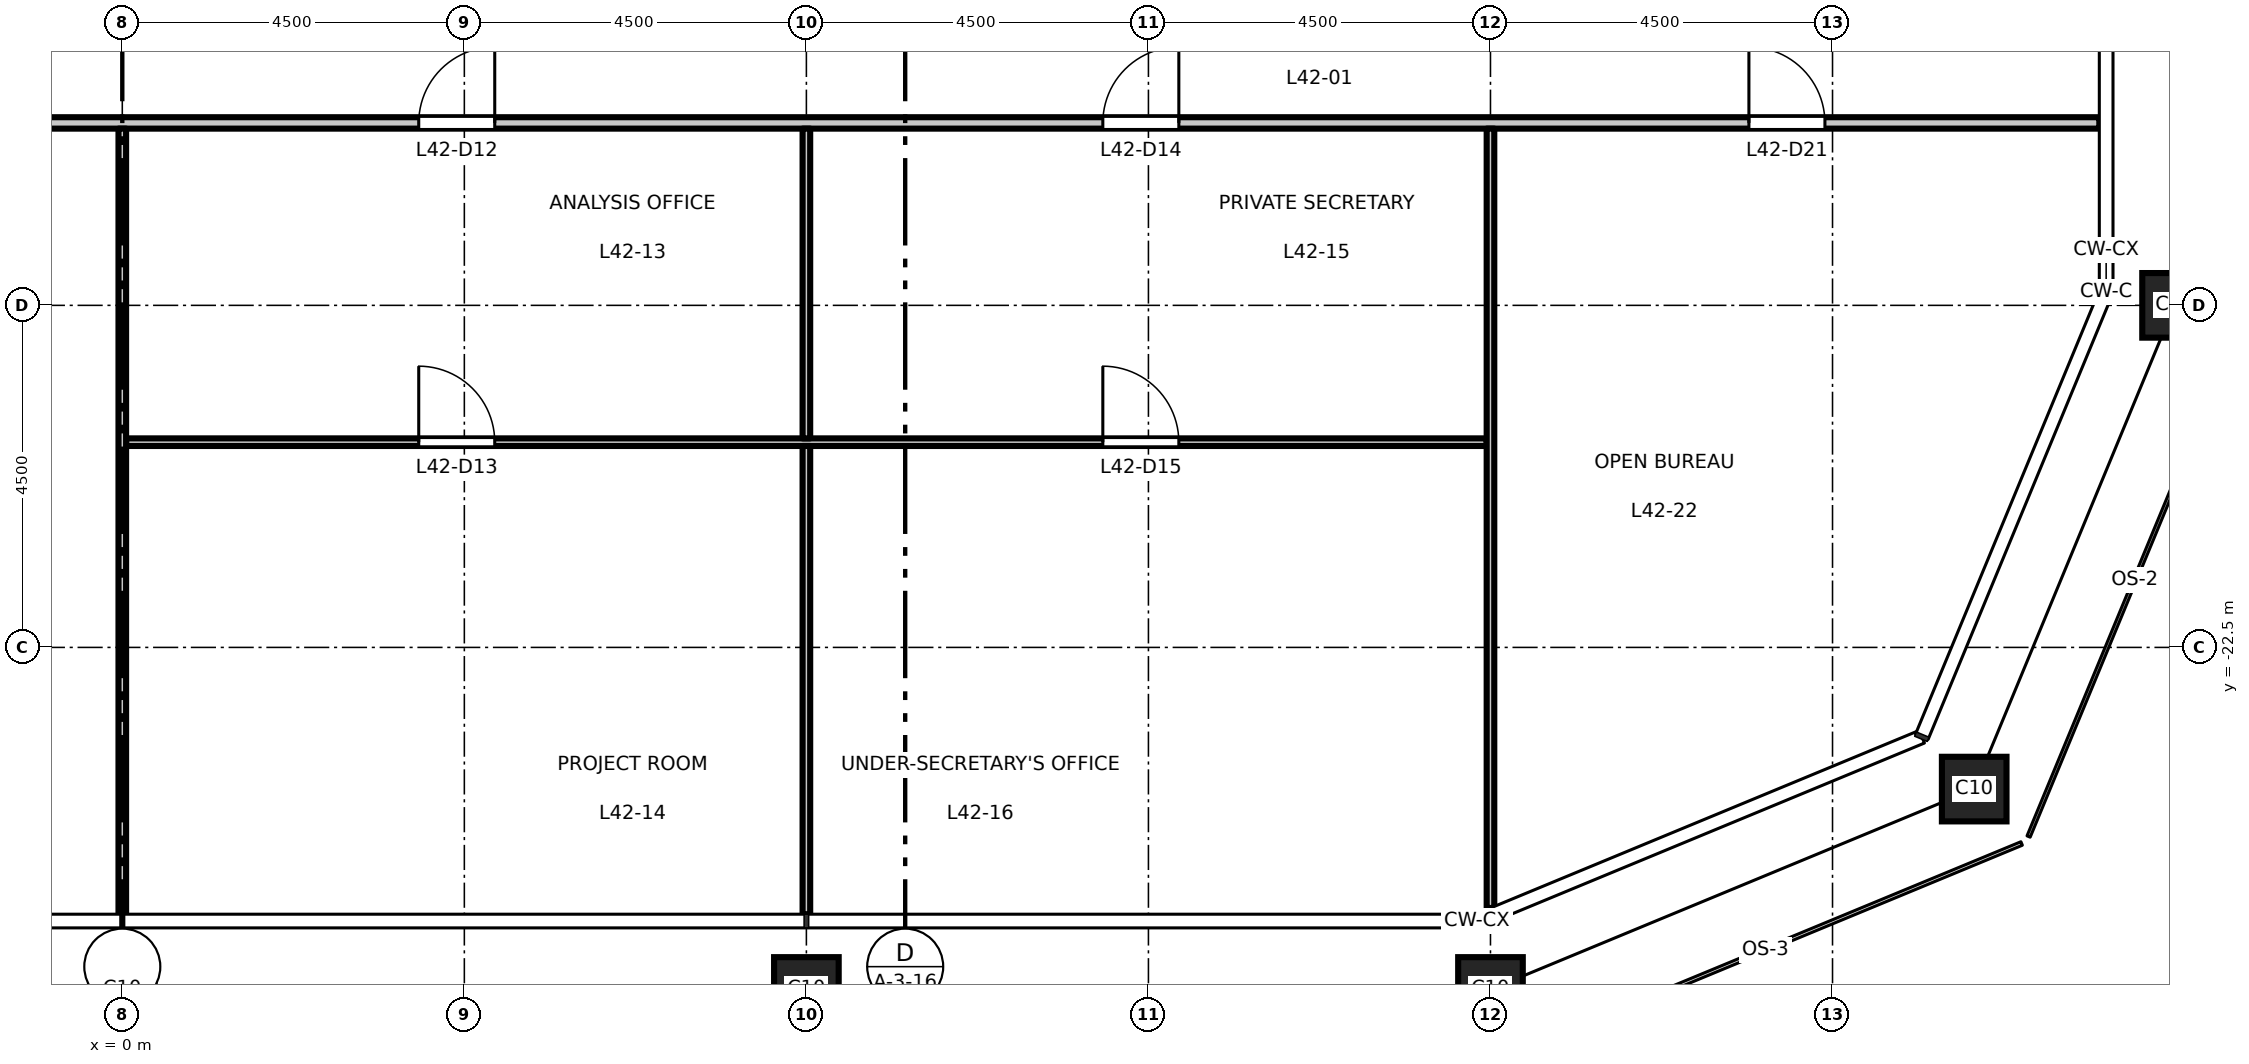
"""IFC4 building model, lengths in metres.
Left out: names, types, materials, properties, quantities, classifications, styles, units other than length and angle.
Written with IfcOpenShell. Run it as: python <this file> out.ifc"""

import sys

from ifc_helpers import new_model, si_unit, direction, frame, frame_2d, origin, origin_2d, place, context, subcontext, project, spatial, rectangle, hollow_rectangle, extrude, element, fill, save


model = new_model("IFC4")
c1 = context("Model", 3, precision=1e-05, world=origin(), true_north=direction((0.0, 1.0)))
c2 = subcontext(c1, "Body", "Model", "MODEL_VIEW")
j1 = project(units=[si_unit("LENGTHUNIT", "METRE"), si_unit("PLANEANGLEUNIT", "RADIAN")], contexts=[c1])
p1 = place(None, origin())
s1 = spatial("IfcSite", under=j1, at=p1, CompositionType="ELEMENT")
p2 = place(p1, origin())
s2 = spatial("IfcBuilding", under=s1, at=p2, CompositionType="ELEMENT")
p3 = place(p2, frame((0.0, 0.0, 197.2)))
s3 = spatial("IfcBuildingStorey", under=s2, at=p3, CompositionType="ELEMENT", Elevation=197.2)
for number, where, z_axis, x_axis in (
    (1, (0.0, -27.0, 0.0), (0.0, 0.0, 1.0), (1.0, 0.0, 0.0)),
    (2, (9.0, -27.0, 0.0), (0.0, 0.0, 1.0), (1.0, 0.0, 0.0)),
    (3, (18.0, -27.0, 0.0), (0.0, 0.0, 1.0), (1.0, 0.0, 0.0)),
    (4, (24.364, -24.364, 0.0), (0.0, 0.0, 1.0), (1.0, 0.0, 0.0)),
    (5, (27.0, -18.0, 0.0), (0.0, 0.0, 1.0), (1.0, 0.0, 0.0)),
):
    element("IfcColumn", number, at=place(p3, frame(where, z_axis=z_axis, x_axis=x_axis)), inside=s3, PredefinedType="COLUMN", context=c2, shape_type="SweptSolid", body=[
        extrude(hollow_rectangle(XDim=0.85, YDim=0.85, WallThickness=0.05, at=origin_2d()), origin(), (0.0, 0.0, 1.0), 4.5),
    ])
p4 = place(p3, frame((0.05, -19.8, 0.0), z_axis=(0.0, 0.0, 1.0), x_axis=(1.0, 0.0, 0.0)))
e6 = element("IfcWall", 6, at=p4, inside=s3, PredefinedType="PARTITIONING", context=c2, shape_type="SweptSolid", body=[
    extrude(rectangle(XDim=17.9, YDim=0.1, at=frame_2d((8.95, 0.0))), origin(), (0.0, 0.0, 1.0), 4.35),
])
p5 = place(p4, frame((3.85, 0.0, 0.0)))
e7 = element("IfcOpeningElement", 7, at=p5, cuts=e6, PredefinedType="OPENING", context=c2, shape_type="SweptSolid", body=[
    extrude(rectangle(XDim=1.0, YDim=2.1, at=frame_2d((0.5, 1.05))), frame((0.0, 0.06, 0.0), z_axis=(0.0, -1.0, 0.0), x_axis=(1.0, 0.0, 0.0)), (0.0, 0.0, 1.0), 0.12),
])
p6 = place(p4, frame((12.85, 0.0, 0.0)))
e8 = element("IfcOpeningElement", 8, at=p6, cuts=e6, PredefinedType="OPENING", context=c2, shape_type="SweptSolid", body=[
    extrude(rectangle(XDim=1.0, YDim=2.1, at=frame_2d((0.5, 1.05))), frame((0.0, 0.06, 0.0), z_axis=(0.0, -1.0, 0.0), x_axis=(1.0, 0.0, 0.0)), (0.0, 0.0, 1.0), 0.12),
])
p7 = place(p3, frame((-26.01, -15.6, 0.0), z_axis=(0.0, 0.0, 1.0), x_axis=(1.0, 0.0, 0.0)))
e9 = element("IfcWall", 9, at=p7, inside=s3, PredefinedType="PARTITIONING", context=c2, shape_type="SweptSolid", body=[
    extrude(rectangle(XDim=52.02, YDim=0.15, at=frame_2d((26.01, 0.0))), origin(), (0.0, 0.0, 1.0), 4.35),
])
p8 = place(p7, frame((11.91, 0.0, 0.0)))
e10 = element("IfcOpeningElement", 10, at=p8, cuts=e9, PredefinedType="OPENING", context=c2, shape_type="SweptSolid", body=[
    extrude(rectangle(XDim=1.0, YDim=2.1, at=frame_2d((0.5, 1.05))), frame((0.0, 0.085, 0.0), z_axis=(0.0, -1.0, 0.0), x_axis=(1.0, 0.0, 0.0)), (0.0, 0.0, 1.0), 0.17),
])
p9 = place(p7, frame((20.91, 0.0, 0.0)))
e11 = element("IfcOpeningElement", 11, at=p9, cuts=e9, PredefinedType="OPENING", context=c2, shape_type="SweptSolid", body=[
    extrude(rectangle(XDim=1.0, YDim=2.1, at=frame_2d((0.5, 1.05))), frame((0.0, 0.085, 0.0), z_axis=(0.0, -1.0, 0.0), x_axis=(1.0, 0.0, 0.0)), (0.0, 0.0, 1.0), 0.17),
])
p10 = place(p7, frame((29.91, 0.0, 0.0)))
e12 = element("IfcOpeningElement", 12, at=p10, cuts=e9, PredefinedType="OPENING", context=c2, shape_type="SweptSolid", body=[
    extrude(rectangle(XDim=1.0, YDim=2.1, at=frame_2d((0.5, 1.05))), frame((0.0, 0.085, 0.0), z_axis=(0.0, -1.0, 0.0), x_axis=(1.0, 0.0, 0.0)), (0.0, 0.0, 1.0), 0.17),
])
p11 = place(p7, frame((38.91, 0.0, 0.0)))
e13 = element("IfcOpeningElement", 13, at=p11, cuts=e9, PredefinedType="OPENING", context=c2, shape_type="SweptSolid", body=[
    extrude(rectangle(XDim=1.0, YDim=2.1, at=frame_2d((0.5, 1.05))), frame((0.0, 0.085, 0.0), z_axis=(0.0, -1.0, 0.0), x_axis=(1.0, 0.0, 0.0)), (0.0, 0.0, 1.0), 0.17),
])
p12 = place(p7, frame((3.4, 0.0, 0.0)))
e14 = element("IfcOpeningElement", 14, at=p12, cuts=e9, PredefinedType="OPENING", context=c2, shape_type="SweptSolid", body=[
    extrude(rectangle(XDim=1.0, YDim=2.1, at=frame_2d((0.5, 1.05))), frame((0.0, 0.085, 0.0), z_axis=(0.0, -1.0, 0.0), x_axis=(1.0, 0.0, 0.0)), (0.0, 0.0, 1.0), 0.17),
])
p13 = place(p7, frame((47.41, 0.0, 0.0)))
e15 = element("IfcOpeningElement", 15, at=p13, cuts=e9, PredefinedType="OPENING", context=c2, shape_type="SweptSolid", body=[
    extrude(rectangle(XDim=1.0, YDim=2.1, at=frame_2d((0.5, 1.05))), frame((0.0, 0.085, 0.0), z_axis=(0.0, -1.0, 0.0), x_axis=(1.0, 0.0, 0.0)), (0.0, 0.0, 1.0), 0.17),
])
p14 = place(p3, frame((0.0, -26.01, 0.0), z_axis=(0.0, 0.0, 1.0), x_axis=(0.0, 1.0, 0.0)))
e16 = element("IfcWall", 16, at=p14, inside=s3, PredefinedType="PARTITIONING", context=c2, shape_type="SweptSolid", body=[
    extrude(rectangle(XDim=10.335, YDim=0.1, at=frame_2d((5.167, 0.0))), origin(), (0.0, 0.0, 1.0), 3.55),
])
p15 = place(p3, frame((9.0, -26.01, 0.0), z_axis=(0.0, 0.0, 1.0), x_axis=(0.0, 1.0, 0.0)))
e17 = element("IfcWall", 17, at=p15, inside=s3, PredefinedType="PARTITIONING", context=c2, shape_type="SweptSolid", body=[
    extrude(rectangle(XDim=6.16, YDim=0.1, at=frame_2d((3.08, 0.0))), origin(), (0.0, 0.0, 1.0), 3.65),
])
p16 = place(p3, frame((9.0, -19.75, 0.0), z_axis=(0.0, 0.0, 1.0), x_axis=(0.0, 1.0, 0.0)))
e18 = element("IfcWall", 18, at=p16, inside=s3, PredefinedType="PARTITIONING", context=c2, shape_type="SweptSolid", body=[
    extrude(rectangle(XDim=4.075, YDim=0.1, at=frame_2d((2.038, 0.0))), origin(), (0.0, 0.0, 1.0), 3.65),
])
p17 = place(p3, frame((18.0, -25.928, 0.0), z_axis=(0.0, 0.0, 1.0), x_axis=(0.0, 1.0, 0.0)))
e19 = element("IfcWall", 19, at=p17, inside=s3, PredefinedType="PARTITIONING", context=c2, shape_type="SweptSolid", body=[
    extrude(rectangle(XDim=10.253, YDim=0.1, at=frame_2d((5.126, 0.0))), origin(), (0.0, 0.0, 1.0), 3.65),
])
p18 = place(p10, origin())
e20 = element("IfcDoor", 20, at=p18, inside=s3, OperationType="SINGLE_SWING_RIGHT", PredefinedType="DOOR", context=c2, shape_type="SweptSolid", body=[
    extrude(rectangle(XDim=1.0, YDim=2.1, at=frame_2d((0.5, 1.05))), frame((0.0, 0.025, 0.0), z_axis=(0.0, -1.0, 0.0), x_axis=(1.0, 0.0, 0.0)), (0.0, 0.0, 1.0), 0.05),
])
fill(e12, e20)
p19 = place(p5, origin())
e21 = element("IfcDoor", 21, at=p19, inside=s3, OperationType="SINGLE_SWING_LEFT", PredefinedType="DOOR", context=c2, shape_type="SweptSolid", body=[
    extrude(rectangle(XDim=1.0, YDim=2.1, at=frame_2d((0.5, 1.05))), frame((0.0, 0.025, 0.0), z_axis=(0.0, -1.0, 0.0), x_axis=(1.0, 0.0, 0.0)), (0.0, 0.0, 1.0), 0.05),
])
fill(e7, e21)
p20 = place(p11, origin())
e22 = element("IfcDoor", 22, at=p20, inside=s3, OperationType="SINGLE_SWING_RIGHT", PredefinedType="DOOR", context=c2, shape_type="SweptSolid", body=[
    extrude(rectangle(XDim=1.0, YDim=2.1, at=frame_2d((0.5, 1.05))), frame((0.0, 0.025, 0.0), z_axis=(0.0, -1.0, 0.0), x_axis=(1.0, 0.0, 0.0)), (0.0, 0.0, 1.0), 0.05),
])
fill(e13, e22)
p21 = place(p6, origin())
e23 = element("IfcDoor", 23, at=p21, inside=s3, OperationType="SINGLE_SWING_LEFT", PredefinedType="DOOR", context=c2, shape_type="SweptSolid", body=[
    extrude(rectangle(XDim=1.0, YDim=2.1, at=frame_2d((0.5, 1.05))), frame((0.0, 0.025, 0.0), z_axis=(0.0, -1.0, 0.0), x_axis=(1.0, 0.0, 0.0)), (0.0, 0.0, 1.0), 0.05),
])
fill(e8, e23)
p22 = place(p13, origin())
e24 = element("IfcDoor", 24, at=p22, inside=s3, OperationType="SINGLE_SWING_LEFT", PredefinedType="DOOR", context=c2, shape_type="SweptSolid", body=[
    extrude(rectangle(XDim=1.0, YDim=2.1, at=frame_2d((0.5, 1.05))), frame((0.0, 0.025, 0.0), z_axis=(0.0, -1.0, 0.0), x_axis=(1.0, 0.0, 0.0)), (0.0, 0.0, 1.0), 0.05),
])
fill(e15, e24)
save(model, sys.argv[1])
